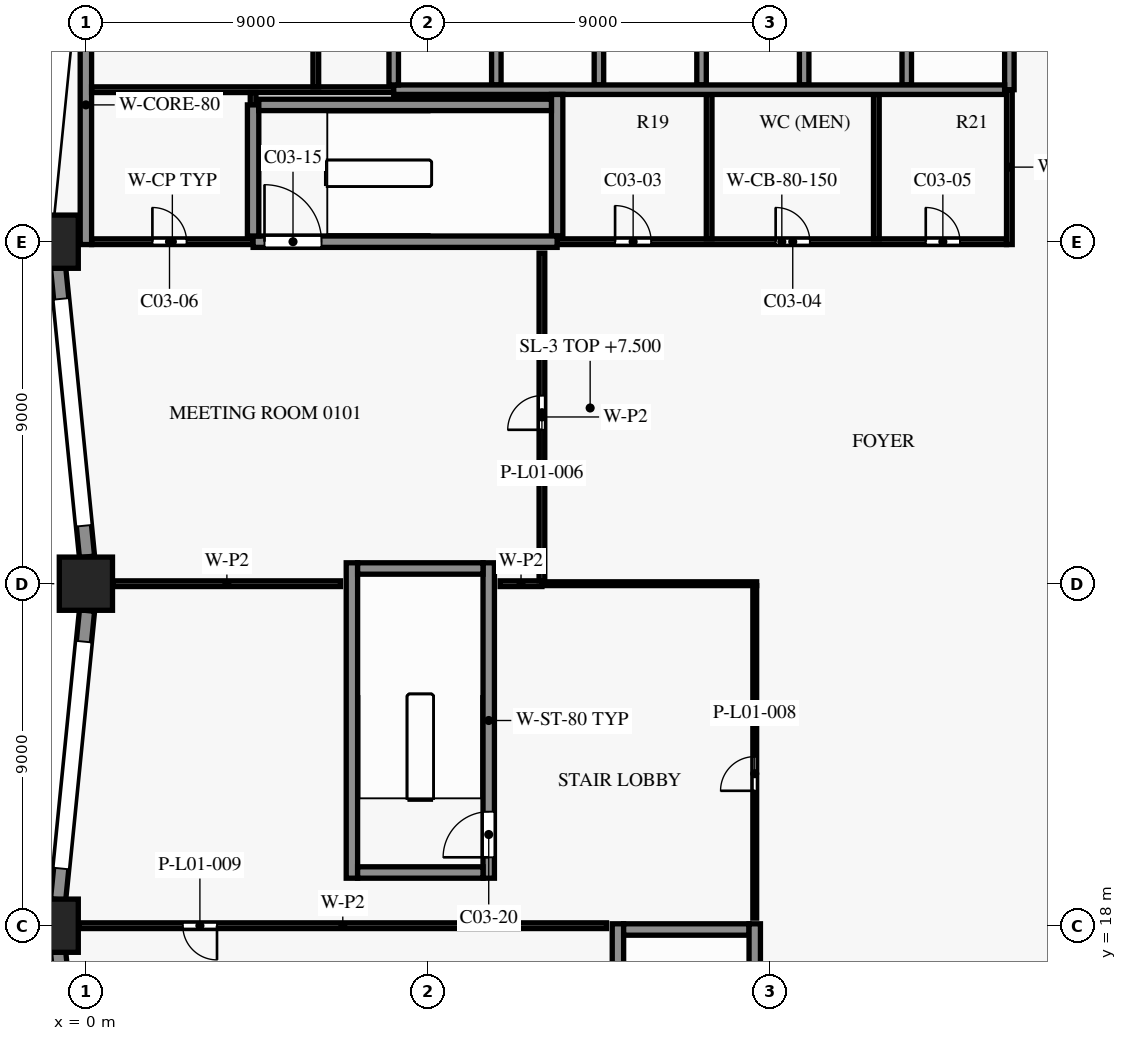
"""IFC4 building model, lengths in metres.
Left out: names, types, materials, properties, quantities, classifications, styles, units other than length and angle.
Written with IfcOpenShell. Run it as: python <this file> out.ifc"""

import sys

from ifc_helpers import new_model, si_unit, direction, frame, frame_2d, origin, origin_2d, place, context, subcontext, project, spatial, rectangle, extrude, element, fill, save


model = new_model("IFC4")
c1 = context("Model", 3, precision=1e-05, world=origin(), true_north=direction((0.0, 1.0)))
c2 = subcontext(c1, "Body", "Model", "MODEL_VIEW")
j1 = project(units=[si_unit("LENGTHUNIT", "METRE"), si_unit("PLANEANGLEUNIT", "RADIAN")], contexts=[c1])
p1 = place(None, origin())
s1 = spatial("IfcSite", under=j1, at=p1, CompositionType="ELEMENT")
p2 = place(p1, origin())
s2 = spatial("IfcBuilding", under=s1, at=p2, CompositionType="ELEMENT")
p3 = place(p2, frame((0.0, 0.0, 7.5)))
s3 = spatial("IfcBuildingStorey", under=s2, at=p3, CompositionType="ELEMENT", Elevation=7.5)
for number, where, z_axis, x_axis in (
    (1, (-0.9, 36.0, 0.0), (0.0, 0.0, 1.0), (1.0, 0.0, 0.0)),
    (2, (0.0, 27.0, 0.0), (0.0, 0.0, 1.0), (1.0, 0.0, 0.0)),
    (3, (-0.9, 18.0, 0.0), (0.0, 0.0, 1.0), (1.0, 0.0, 0.0)),
):
    element("IfcColumn", number, at=place(p3, frame(where, z_axis=z_axis, x_axis=x_axis)), inside=s3, PredefinedType="COLUMN", context=c2, shape_type="SweptSolid", body=[
        extrude(rectangle(XDim=1.4, YDim=1.4, at=origin_2d()), origin(), (0.0, 0.0, 1.0), 7.0),
    ])
p4 = place(p3, frame((0.03, 27.707, 0.0), z_axis=(0.0, 0.0, 1.0), x_axis=(-0.099478423711, 0.995039719416, 0.0)))
e4 = element("IfcWall", 4, at=p4, inside=s3, PredefinedType="SOLIDWALL", context=c2, shape_type="SweptSolid", body=[
    extrude(rectangle(XDim=7.645, YDim=0.4, at=frame_2d((3.822, 0.0))), origin(), (0.0, 0.0, 1.0), 6.1),
])
p5 = place(p4, frame((0.823, 0.0, 0.9)))
e5 = element("IfcOpeningElement", 5, at=p5, cuts=e4, PredefinedType="OPENING", context=c2, shape_type="SweptSolid", body=[
    extrude(rectangle(XDim=6.0, YDim=1.8, at=frame_2d((3.0, 0.9))), frame((0.0, 0.21, 0.0), z_axis=(0.0, -1.0, 0.0), x_axis=(1.0, 0.0, 0.0)), (0.0, 0.0, 1.0), 0.42),
])
p6 = place(p3, frame((-0.731, 18.687, 0.0), z_axis=(0.0, 0.0, 1.0), x_axis=(0.099478423711, 0.995039719416, 0.0)))
e6 = element("IfcWall", 6, at=p6, inside=s3, PredefinedType="SOLIDWALL", context=c2, shape_type="SweptSolid", body=[
    extrude(rectangle(XDim=7.645, YDim=0.4, at=frame_2d((3.822, 0.0))), origin(), (0.0, 0.0, 1.0), 6.1),
])
p7 = place(p6, frame((0.823, 0.0, 0.9)))
e7 = element("IfcOpeningElement", 7, at=p7, cuts=e6, PredefinedType="OPENING", context=c2, shape_type="SweptSolid", body=[
    extrude(rectangle(XDim=6.0, YDim=1.8, at=frame_2d((3.0, 0.9))), frame((0.0, 0.21, 0.0), z_axis=(0.0, -1.0, 0.0), x_axis=(1.0, 0.0, 0.0)), (0.0, 0.0, 1.0), 0.42),
])
p8 = place(p3, frame((0.03, 9.707, 0.0), z_axis=(0.0, 0.0, 1.0), x_axis=(-0.099478423711, 0.995039719416, 0.0)))
e8 = element("IfcWall", 8, at=p8, inside=s3, PredefinedType="SOLIDWALL", context=c2, shape_type="SweptSolid", body=[
    extrude(rectangle(XDim=7.645, YDim=0.4, at=frame_2d((3.822, 0.0))), origin(), (0.0, 0.0, 1.0), 6.1),
])
p9 = place(p8, frame((0.823, 0.0, 0.9)))
e9 = element("IfcOpeningElement", 9, at=p9, cuts=e8, PredefinedType="OPENING", context=c2, shape_type="SweptSolid", body=[
    extrude(rectangle(XDim=6.0, YDim=1.8, at=frame_2d((3.0, 0.9))), frame((0.0, 0.21, 0.0), z_axis=(0.0, -1.0, 0.0), x_axis=(1.0, 0.0, 0.0)), (0.0, 0.0, 1.0), 0.42),
])
for number, where, z_axis, x_axis in (
    (10, (14.15, 17.9, 0.0), (0.0, 0.0, 1.0), (1.0, 0.0, 0.0)),
    (11, (7.15, 19.4, 0.0), (0.0, 0.0, 1.0), (1.0, 0.0, 0.0)),
    (12, (7.15, 27.4, 0.0), (0.0, 0.0, 1.0), (1.0, 0.0, 0.0)),
):
    element("IfcWall", number, at=place(p3, frame(where, z_axis=z_axis, x_axis=x_axis)), inside=s3, PredefinedType="SHEAR", context=c2, shape_type="SweptSolid", body=[
        extrude(rectangle(XDim=3.3, YDim=0.3, at=frame_2d((1.65, 0.0))), origin(), (0.0, 0.0, 1.0), 6.7),
    ])
p10 = place(p3, frame((0.15, 36.0, 0.0), z_axis=(0.0, 0.0, 1.0), x_axis=(1.0, 0.0, 0.0)))
e13 = element("IfcWall", 13, at=p10, inside=s3, PredefinedType="PARTITIONING", context=c2, shape_type="SweptSolid", body=[
    extrude(rectangle(XDim=4.25, YDim=0.15, at=frame_2d((2.125, 0.0))), origin(), (0.0, 0.0, 1.0), 6.7),
])
p11 = place(p10, frame((1.6, 0.0, 0.0)))
e14 = element("IfcOpeningElement", 14, at=p11, cuts=e13, PredefinedType="OPENING", context=c2, shape_type="SweptSolid", body=[
    extrude(rectangle(XDim=0.9, YDim=2.1, at=frame_2d((0.45, 1.05))), frame((0.0, 0.085, 0.0), z_axis=(0.0, -1.0, 0.0), x_axis=(1.0, 0.0, 0.0)), (0.0, 0.0, 1.0), 0.17),
])
p12 = place(p3, frame((12.4, 36.0, 0.0), z_axis=(0.0, 0.0, 1.0), x_axis=(1.0, 0.0, 0.0)))
e15 = element("IfcWall", 15, at=p12, inside=s3, PredefinedType="SHEAR", context=c2, shape_type="SweptSolid", body=[
    extrude(rectangle(XDim=11.825, YDim=0.15, at=frame_2d((5.913, 0.0))), origin(), (0.0, 0.0, 1.0), 6.7),
])
p13 = place(p12, frame((1.525, 0.0, 0.0)))
e16 = element("IfcOpeningElement", 16, at=p13, cuts=e15, PredefinedType="OPENING", context=c2, shape_type="SweptSolid", body=[
    extrude(rectangle(XDim=0.95, YDim=2.1, at=frame_2d((0.475, 1.05))), frame((0.0, 0.085, 0.0), z_axis=(0.0, -1.0, 0.0), x_axis=(1.0, 0.0, 0.0)), (0.0, 0.0, 1.0), 0.17),
])
p14 = place(p12, frame((5.75, 0.0, 0.0)))
e17 = element("IfcOpeningElement", 17, at=p14, cuts=e15, PredefinedType="OPENING", context=c2, shape_type="SweptSolid", body=[
    extrude(rectangle(XDim=0.9, YDim=2.1, at=frame_2d((0.45, 1.05))), frame((0.0, 0.085, 0.0), z_axis=(0.0, -1.0, 0.0), x_axis=(1.0, 0.0, 0.0)), (0.0, 0.0, 1.0), 0.17),
])
p15 = place(p12, frame((9.7, 0.0, 0.0)))
e18 = element("IfcOpeningElement", 18, at=p15, cuts=e15, PredefinedType="OPENING", context=c2, shape_type="SweptSolid", body=[
    extrude(rectangle(XDim=0.9, YDim=2.1, at=frame_2d((0.45, 1.05))), frame((0.0, 0.085, 0.0), z_axis=(0.0, -1.0, 0.0), x_axis=(1.0, 0.0, 0.0)), (0.0, 0.0, 1.0), 0.17),
])
p16 = place(p3, frame((4.4, 36.0, 0.0), z_axis=(0.0, 0.0, 1.0), x_axis=(1.0, 0.0, 0.0)))
e19 = element("IfcWall", 19, at=p16, inside=s3, PredefinedType="SHEAR", context=c2, shape_type="SweptSolid", body=[
    extrude(rectangle(XDim=8.0, YDim=0.3, at=frame_2d((4.0, 0.0))), origin(), (0.0, 0.0, 1.0), 6.7),
])
p17 = place(p16, frame((0.3, 0.0, 0.0)))
e20 = element("IfcOpeningElement", 20, at=p17, cuts=e19, PredefinedType="OPENING", context=c2, shape_type="SweptSolid", body=[
    extrude(rectangle(XDim=1.5, YDim=2.2, at=frame_2d((0.75, 1.1))), frame((0.0, 0.16, 0.0), z_axis=(0.0, -1.0, 0.0), x_axis=(1.0, 0.0, 0.0)), (0.0, 0.0, 1.0), 0.32),
])
p18 = place(p3, frame((4.55, 39.6, 0.0), z_axis=(0.0, 0.0, 1.0), x_axis=(1.0, 0.0, 0.0)))
e21 = element("IfcWall", 21, at=p18, inside=s3, PredefinedType="SHEAR", context=c2, shape_type="SweptSolid", body=[
    extrude(rectangle(XDim=7.7, YDim=0.3, at=frame_2d((3.85, 0.0))), origin(), (0.0, 0.0, 1.0), 6.7),
])
p19 = place(p3, frame((0.15, 40.0, 0.0), z_axis=(0.0, 0.0, 1.0), x_axis=(1.0, 0.0, 0.0)))
e22 = element("IfcWall", 22, at=p19, inside=s3, PredefinedType="PARTITIONING", context=c2, shape_type="SweptSolid", body=[
    extrude(rectangle(XDim=7.95, YDim=0.15, at=frame_2d((3.975, 0.0))), origin(), (0.0, 0.0, 1.0), 6.7),
])
p20 = place(p3, frame((8.1, 40.0, 0.0), z_axis=(0.0, 0.0, 1.0), x_axis=(1.0, 0.0, 0.0)))
e23 = element("IfcWall", 23, at=p20, inside=s3, PredefinedType="SHEAR", context=c2, shape_type="SweptSolid", body=[
    extrude(rectangle(XDim=16.075, YDim=0.25, at=frame_2d((8.038, 0.0))), origin(), (0.0, 0.0, 1.0), 6.7),
])
p21 = place(p3, frame((0.0, 35.925, 0.0), z_axis=(0.0, 0.0, 1.0), x_axis=(0.0, 1.0, 0.0)))
e24 = element("IfcWall", 24, at=p21, inside=s3, PredefinedType="SHEAR", context=c2, shape_type="SweptSolid", body=[
    extrude(rectangle(XDim=7.35, YDim=0.3, at=frame_2d((3.675, 0.0))), origin(), (0.0, 0.0, 1.0), 6.7),
])
p22 = place(p3, frame((4.4, 39.6, 0.0), z_axis=(0.0, 0.0, 1.0), x_axis=(0.0, 1.0, 0.0)))
e25 = element("IfcWall", 25, at=p22, inside=s3, PredefinedType="PARTITIONING", context=c2, shape_type="SweptSolid", body=[
    extrude(rectangle(XDim=0.325, YDim=0.15, at=frame_2d((0.163, 0.0))), origin(), (0.0, 0.0, 1.0), 6.7),
])
p23 = place(p3, frame((4.4, 36.15, 0.0), z_axis=(0.0, 0.0, 1.0), x_axis=(0.0, 1.0, 0.0)))
e26 = element("IfcWall", 26, at=p23, inside=s3, PredefinedType="SHEAR", context=c2, shape_type="SweptSolid", body=[
    extrude(rectangle(XDim=3.45, YDim=0.3, at=frame_2d((1.725, 0.0))), origin(), (0.0, 0.0, 1.0), 6.7),
])
p24 = place(p3, frame((6.05, 40.075, 0.0), z_axis=(0.0, 0.0, 1.0), x_axis=(0.0, 1.0, 0.0)))
e27 = element("IfcWall", 27, at=p24, inside=s3, PredefinedType="PARTITIONING", context=c2, shape_type="SweptSolid", body=[
    extrude(rectangle(XDim=3.05, YDim=0.15, at=frame_2d((1.525, 0.0))), origin(), (0.0, 0.0, 1.0), 6.7),
])
p25 = place(p3, frame((7.0, 19.25, 0.0), z_axis=(0.0, 0.0, 1.0), x_axis=(0.0, 1.0, 0.0)))
e28 = element("IfcWall", 28, at=p25, inside=s3, PredefinedType="SHEAR", context=c2, shape_type="SweptSolid", body=[
    extrude(rectangle(XDim=8.3, YDim=0.3, at=frame_2d((4.15, 0.0))), origin(), (0.0, 0.0, 1.0), 6.7),
])
p26 = place(p3, frame((8.1, 40.125, 0.0), z_axis=(0.0, 0.0, 1.0), x_axis=(0.0, 1.0, 0.0)))
e29 = element("IfcWall", 29, at=p26, inside=s3, PredefinedType="SHEAR", context=c2, shape_type="SweptSolid", body=[
    extrude(rectangle(XDim=2.95, YDim=0.25, at=frame_2d((1.475, 0.0))), origin(), (0.0, 0.0, 1.0), 6.7),
])
p27 = place(p3, frame((10.6, 19.25, 0.0), z_axis=(0.0, 0.0, 1.0), x_axis=(0.0, 1.0, 0.0)))
e30 = element("IfcWall", 30, at=p27, inside=s3, PredefinedType="SHEAR", context=c2, shape_type="SweptSolid", body=[
    extrude(rectangle(XDim=8.3, YDim=0.3, at=frame_2d((4.15, 0.0))), origin(), (0.0, 0.0, 1.0), 6.7),
])
p28 = place(p27, frame((0.55, 0.0, 0.0)))
e31 = element("IfcOpeningElement", 31, at=p28, cuts=e30, PredefinedType="OPENING", context=c2, shape_type="SweptSolid", body=[
    extrude(rectangle(XDim=1.2, YDim=2.2, at=frame_2d((0.6, 1.1))), frame((0.0, 0.16, 0.0), z_axis=(0.0, -1.0, 0.0), x_axis=(1.0, 0.0, 0.0)), (0.0, 0.0, 1.0), 0.32),
])
p29 = place(p3, frame((10.8, 40.125, 0.0), z_axis=(0.0, 0.0, 1.0), x_axis=(0.0, 1.0, 0.0)))
e32 = element("IfcWall", 32, at=p29, inside=s3, PredefinedType="SHEAR", context=c2, shape_type="SweptSolid", body=[
    extrude(rectangle(XDim=2.95, YDim=0.25, at=frame_2d((1.475, 0.0))), origin(), (0.0, 0.0, 1.0), 6.7),
])
p30 = place(p3, frame((12.4, 36.15, 0.0), z_axis=(0.0, 0.0, 1.0), x_axis=(0.0, 1.0, 0.0)))
e33 = element("IfcWall", 33, at=p30, inside=s3, PredefinedType="SHEAR", context=c2, shape_type="SweptSolid", body=[
    extrude(rectangle(XDim=3.725, YDim=0.3, at=frame_2d((1.863, 0.0))), origin(), (0.0, 0.0, 1.0), 6.7),
])
p31 = place(p3, frame((13.5, 40.125, 0.0), z_axis=(0.0, 0.0, 1.0), x_axis=(0.0, 1.0, 0.0)))
e34 = element("IfcWall", 34, at=p31, inside=s3, PredefinedType="SHEAR", context=c2, shape_type="SweptSolid", body=[
    extrude(rectangle(XDim=2.95, YDim=0.25, at=frame_2d((1.475, 0.0))), origin(), (0.0, 0.0, 1.0), 6.7),
])
p32 = place(p3, frame((14.0, 9.75, 0.0), z_axis=(0.0, 0.0, 1.0), x_axis=(0.0, 1.0, 0.0)))
e35 = element("IfcWall", 35, at=p32, inside=s3, PredefinedType="SHEAR", context=c2, shape_type="SweptSolid", body=[
    extrude(rectangle(XDim=8.3, YDim=0.3, at=frame_2d((4.15, 0.0))), origin(), (0.0, 0.0, 1.0), 6.7),
])
p33 = place(p3, frame((16.2, 40.125, 0.0), z_axis=(0.0, 0.0, 1.0), x_axis=(0.0, 1.0, 0.0)))
e36 = element("IfcWall", 36, at=p33, inside=s3, PredefinedType="SHEAR", context=c2, shape_type="SweptSolid", body=[
    extrude(rectangle(XDim=2.95, YDim=0.25, at=frame_2d((1.475, 0.0))), origin(), (0.0, 0.0, 1.0), 6.7),
])
p34 = place(p3, frame((16.4, 36.075, 0.0), z_axis=(0.0, 0.0, 1.0), x_axis=(0.0, 1.0, 0.0)))
e37 = element("IfcWall", 37, at=p34, inside=s3, PredefinedType="PARTITIONING", context=c2, shape_type="SweptSolid", body=[
    extrude(rectangle(XDim=3.8, YDim=0.15, at=frame_2d((1.9, 0.0))), origin(), (0.0, 0.0, 1.0), 6.7),
])
p35 = place(p3, frame((17.6, 9.75, 0.0), z_axis=(0.0, 0.0, 1.0), x_axis=(0.0, 1.0, 0.0)))
e38 = element("IfcWall", 38, at=p35, inside=s3, PredefinedType="SHEAR", context=c2, shape_type="SweptSolid", body=[
    extrude(rectangle(XDim=8.3, YDim=0.3, at=frame_2d((4.15, 0.0))), origin(), (0.0, 0.0, 1.0), 6.7),
])
p36 = place(p35, frame((0.65, 0.0, 0.0)))
e39 = element("IfcOpeningElement", 39, at=p36, cuts=e38, PredefinedType="OPENING", context=c2, shape_type="SweptSolid", body=[
    extrude(rectangle(XDim=1.2, YDim=2.2, at=frame_2d((0.6, 1.1))), frame((0.0, 0.16, 0.0), z_axis=(0.0, -1.0, 0.0), x_axis=(1.0, 0.0, 0.0)), (0.0, 0.0, 1.0), 0.32),
])
p37 = place(p3, frame((18.9, 40.125, 0.0), z_axis=(0.0, 0.0, 1.0), x_axis=(0.0, 1.0, 0.0)))
e40 = element("IfcWall", 40, at=p37, inside=s3, PredefinedType="SHEAR", context=c2, shape_type="SweptSolid", body=[
    extrude(rectangle(XDim=2.95, YDim=0.25, at=frame_2d((1.475, 0.0))), origin(), (0.0, 0.0, 1.0), 6.7),
])
p38 = place(p3, frame((20.8, 36.075, 0.0), z_axis=(0.0, 0.0, 1.0), x_axis=(0.0, 1.0, 0.0)))
e41 = element("IfcWall", 41, at=p38, inside=s3, PredefinedType="PARTITIONING", context=c2, shape_type="SweptSolid", body=[
    extrude(rectangle(XDim=3.8, YDim=0.15, at=frame_2d((1.9, 0.0))), origin(), (0.0, 0.0, 1.0), 6.7),
])
p39 = place(p3, frame((21.6, 40.125, 0.0), z_axis=(0.0, 0.0, 1.0), x_axis=(0.0, 1.0, 0.0)))
e42 = element("IfcWall", 42, at=p39, inside=s3, PredefinedType="SHEAR", context=c2, shape_type="SweptSolid", body=[
    extrude(rectangle(XDim=2.95, YDim=0.25, at=frame_2d((1.475, 0.0))), origin(), (0.0, 0.0, 1.0), 6.7),
])
p40 = place(p3, frame((24.3, 35.925, 0.0), z_axis=(0.0, 0.0, 1.0), x_axis=(0.0, 1.0, 0.0)))
e43 = element("IfcWall", 43, at=p40, inside=s3, PredefinedType="SHEAR", context=c2, shape_type="SweptSolid", body=[
    extrude(rectangle(XDim=4.075, YDim=0.15, at=frame_2d((2.038, 0.0))), origin(), (0.0, 0.0, 1.0), 6.7),
])
p41 = place(p3, frame((24.3, 40.0, 0.0), z_axis=(0.0, 0.0, 1.0), x_axis=(0.0, 1.0, 0.0)))
e44 = element("IfcWall", 44, at=p41, inside=s3, PredefinedType="SHEAR", context=c2, shape_type="SweptSolid", body=[
    extrude(rectangle(XDim=3.325, YDim=0.25, at=frame_2d((1.663, 0.0))), origin(), (0.0, 0.0, 1.0), 6.7),
])
p42 = place(p3, frame((13.7, 18.0, 0.0), z_axis=(0.0, 0.0, 1.0), x_axis=(-1.0, 0.0, 0.0)))
e45 = element("IfcWall", 45, at=p42, inside=s3, PredefinedType="PARTITIONING", context=c2, shape_type="SweptSolid", body=[
    extrude(rectangle(XDim=13.88, YDim=0.15, at=frame_2d((6.94, 0.0))), origin(), (0.0, 0.0, 1.0), 5.98),
])
p43 = place(p42, frame((10.25, 0.0, 0.0)))
e46 = element("IfcOpeningElement", 46, at=p43, cuts=e45, PredefinedType="OPENING", context=c2, shape_type="SweptSolid", body=[
    extrude(rectangle(XDim=0.9, YDim=2.1, at=frame_2d((0.45, 1.05))), frame((0.0, 0.085, 0.0), z_axis=(0.0, -1.0, 0.0), x_axis=(1.0, 0.0, 0.0)), (0.0, 0.0, 1.0), 0.17),
])
p44 = place(p3, frame((17.6, 18.2, 0.0), z_axis=(0.0, 0.0, 1.0), x_axis=(0.0, 1.0, 0.0)))
e47 = element("IfcWall", 47, at=p44, inside=s3, PredefinedType="PARTITIONING", context=c2, shape_type="SweptSolid", body=[
    extrude(rectangle(XDim=8.75, YDim=0.1, at=frame_2d((4.375, 0.0))), origin(), (0.0, 0.0, 1.0), 5.98),
])
p45 = place(p44, frame((3.35, 0.0, 0.0)))
e48 = element("IfcOpeningElement", 48, at=p45, cuts=e47, PredefinedType="OPENING", context=c2, shape_type="SweptSolid", body=[
    extrude(rectangle(XDim=0.9, YDim=2.1, at=frame_2d((0.45, 1.05))), frame((0.0, 0.06, 0.0), z_axis=(0.0, -1.0, 0.0), x_axis=(1.0, 0.0, 0.0)), (0.0, 0.0, 1.0), 0.12),
])
p46 = place(p3, frame((0.72, 27.0, 0.0), z_axis=(0.0, 0.0, 1.0), x_axis=(1.0, 0.0, 0.0)))
e49 = element("IfcWall", 49, at=p46, inside=s3, PredefinedType="PARTITIONING", context=c2, shape_type="SweptSolid", body=[
    extrude(rectangle(XDim=5.98, YDim=0.15, at=frame_2d((2.99, 0.0))), origin(), (0.0, 0.0, 1.0), 5.98),
])
p47 = place(p3, frame((10.9, 27.0, 0.0), z_axis=(0.0, 0.0, 1.0), x_axis=(1.0, 0.0, 0.0)))
e50 = element("IfcWall", 50, at=p47, inside=s3, PredefinedType="PARTITIONING", context=c2, shape_type="SweptSolid", body=[
    extrude(rectangle(XDim=1.1, YDim=0.15, at=frame_2d((0.55, 0.0))), origin(), (0.0, 0.0, 1.0), 5.98),
])
p48 = place(p3, frame((17.65, 27.0, 0.0), z_axis=(0.0, 0.0, 1.0), x_axis=(-1.0, 0.0, 0.0)))
e51 = element("IfcWall", 51, at=p48, inside=s3, PredefinedType="PARTITIONING", context=c2, shape_type="SweptSolid", body=[
    extrude(rectangle(XDim=5.65, YDim=0.1, at=frame_2d((2.825, 0.0))), origin(), (0.0, 0.0, 1.0), 5.98),
])
p49 = place(p3, frame((12.0, 27.075, 0.0), z_axis=(0.0, 0.0, 1.0), x_axis=(0.0, 1.0, 0.0)))
e52 = element("IfcWall", 52, at=p49, inside=s3, PredefinedType="PARTITIONING", context=c2, shape_type="SweptSolid", body=[
    extrude(rectangle(XDim=8.625, YDim=0.15, at=frame_2d((4.312, 0.0))), origin(), (0.0, 0.0, 1.0), 5.98),
])
p50 = place(p49, frame((3.975, 0.0, 0.0)))
e53 = element("IfcOpeningElement", 53, at=p50, cuts=e52, PredefinedType="OPENING", context=c2, shape_type="SweptSolid", body=[
    extrude(rectangle(XDim=0.9, YDim=2.1, at=frame_2d((0.45, 1.05))), frame((0.0, 0.085, 0.0), z_axis=(0.0, -1.0, 0.0), x_axis=(1.0, 0.0, 0.0)), (0.0, 0.0, 1.0), 0.17),
])
p51 = place(p5, origin())
e54 = element("IfcWindow", 54, at=p51, inside=s3, PartitioningType="SINGLE_PANEL", PredefinedType="WINDOW", context=c2, shape_type="SweptSolid", body=[
    extrude(rectangle(XDim=6.0, YDim=1.8, at=frame_2d((3.0, 0.9))), frame((0.0, 0.03, 0.0), z_axis=(0.0, -1.0, 0.0), x_axis=(1.0, 0.0, 0.0)), (0.0, 0.0, 1.0), 0.06),
])
fill(e5, e54)
p52 = place(p7, origin())
e55 = element("IfcWindow", 55, at=p52, inside=s3, PartitioningType="SINGLE_PANEL", PredefinedType="WINDOW", context=c2, shape_type="SweptSolid", body=[
    extrude(rectangle(XDim=6.0, YDim=1.8, at=frame_2d((3.0, 0.9))), frame((0.0, 0.03, 0.0), z_axis=(0.0, -1.0, 0.0), x_axis=(1.0, 0.0, 0.0)), (0.0, 0.0, 1.0), 0.06),
])
fill(e7, e55)
p53 = place(p13, origin())
e56 = element("IfcDoor", 56, at=p53, inside=s3, OperationType="SINGLE_SWING_RIGHT", PredefinedType="DOOR", context=c2, shape_type="SweptSolid", body=[
    extrude(rectangle(XDim=0.95, YDim=2.1, at=frame_2d((0.475, 1.05))), frame((0.0, 0.025, 0.0), z_axis=(0.0, -1.0, 0.0), x_axis=(1.0, 0.0, 0.0)), (0.0, 0.0, 1.0), 0.05),
])
fill(e16, e56)
p54 = place(p14, origin())
e57 = element("IfcDoor", 57, at=p54, inside=s3, OperationType="SINGLE_SWING_LEFT", PredefinedType="DOOR", context=c2, shape_type="SweptSolid", body=[
    extrude(rectangle(XDim=0.9, YDim=2.1, at=frame_2d((0.45, 1.05))), frame((0.0, 0.025, 0.0), z_axis=(0.0, -1.0, 0.0), x_axis=(1.0, 0.0, 0.0)), (0.0, 0.0, 1.0), 0.05),
])
fill(e17, e57)
p55 = place(p15, origin())
e58 = element("IfcDoor", 58, at=p55, inside=s3, OperationType="SINGLE_SWING_RIGHT", PredefinedType="DOOR", context=c2, shape_type="SweptSolid", body=[
    extrude(rectangle(XDim=0.9, YDim=2.1, at=frame_2d((0.45, 1.05))), frame((0.0, 0.025, 0.0), z_axis=(0.0, -1.0, 0.0), x_axis=(1.0, 0.0, 0.0)), (0.0, 0.0, 1.0), 0.05),
])
fill(e18, e58)
p56 = place(p11, origin())
e59 = element("IfcDoor", 59, at=p56, inside=s3, OperationType="SINGLE_SWING_LEFT", PredefinedType="DOOR", context=c2, shape_type="SweptSolid", body=[
    extrude(rectangle(XDim=0.9, YDim=2.1, at=frame_2d((0.45, 1.05))), frame((0.0, 0.025, 0.0), z_axis=(0.0, -1.0, 0.0), x_axis=(1.0, 0.0, 0.0)), (0.0, 0.0, 1.0), 0.05),
])
fill(e14, e59)
p57 = place(p17, origin())
e60 = element("IfcDoor", 60, at=p57, inside=s3, OperationType="SINGLE_SWING_RIGHT", PredefinedType="DOOR", context=c2, shape_type="SweptSolid", body=[
    extrude(rectangle(XDim=1.5, YDim=2.2, at=frame_2d((0.75, 1.1))), frame((0.0, 0.025, 0.0), z_axis=(0.0, -1.0, 0.0), x_axis=(1.0, 0.0, 0.0)), (0.0, 0.0, 1.0), 0.05),
])
fill(e20, e60)
p58 = place(p28, origin())
e61 = element("IfcDoor", 61, at=p58, inside=s3, OperationType="SINGLE_SWING_RIGHT", PredefinedType="DOOR", context=c2, shape_type="SweptSolid", body=[
    extrude(rectangle(XDim=1.2, YDim=2.2, at=frame_2d((0.6, 1.1))), frame((0.0, 0.025, 0.0), z_axis=(0.0, -1.0, 0.0), x_axis=(1.0, 0.0, 0.0)), (0.0, 0.0, 1.0), 0.05),
])
fill(e31, e61)
p59 = place(p50, origin())
e62 = element("IfcDoor", 62, at=p59, inside=s3, OperationType="SINGLE_SWING_RIGHT", PredefinedType="DOOR", context=c2, shape_type="SweptSolid", body=[
    extrude(rectangle(XDim=0.9, YDim=2.1, at=frame_2d((0.45, 1.05))), frame((0.0, 0.025, 0.0), z_axis=(0.0, -1.0, 0.0), x_axis=(1.0, 0.0, 0.0)), (0.0, 0.0, 1.0), 0.05),
])
fill(e53, e62)
p60 = place(p45, origin())
e63 = element("IfcDoor", 63, at=p60, inside=s3, OperationType="SINGLE_SWING_LEFT", PredefinedType="DOOR", context=c2, shape_type="SweptSolid", body=[
    extrude(rectangle(XDim=0.9, YDim=2.1, at=frame_2d((0.45, 1.05))), frame((0.0, 0.025, 0.0), z_axis=(0.0, -1.0, 0.0), x_axis=(1.0, 0.0, 0.0)), (0.0, 0.0, 1.0), 0.05),
])
fill(e48, e63)
p61 = place(p43, origin())
e64 = element("IfcDoor", 64, at=p61, inside=s3, OperationType="SINGLE_SWING_RIGHT", PredefinedType="DOOR", context=c2, shape_type="SweptSolid", body=[
    extrude(rectangle(XDim=0.9, YDim=2.1, at=frame_2d((0.45, 1.05))), frame((0.0, 0.025, 0.0), z_axis=(0.0, -1.0, 0.0), x_axis=(1.0, 0.0, 0.0)), (0.0, 0.0, 1.0), 0.05),
])
fill(e46, e64)
save(model, sys.argv[1])
